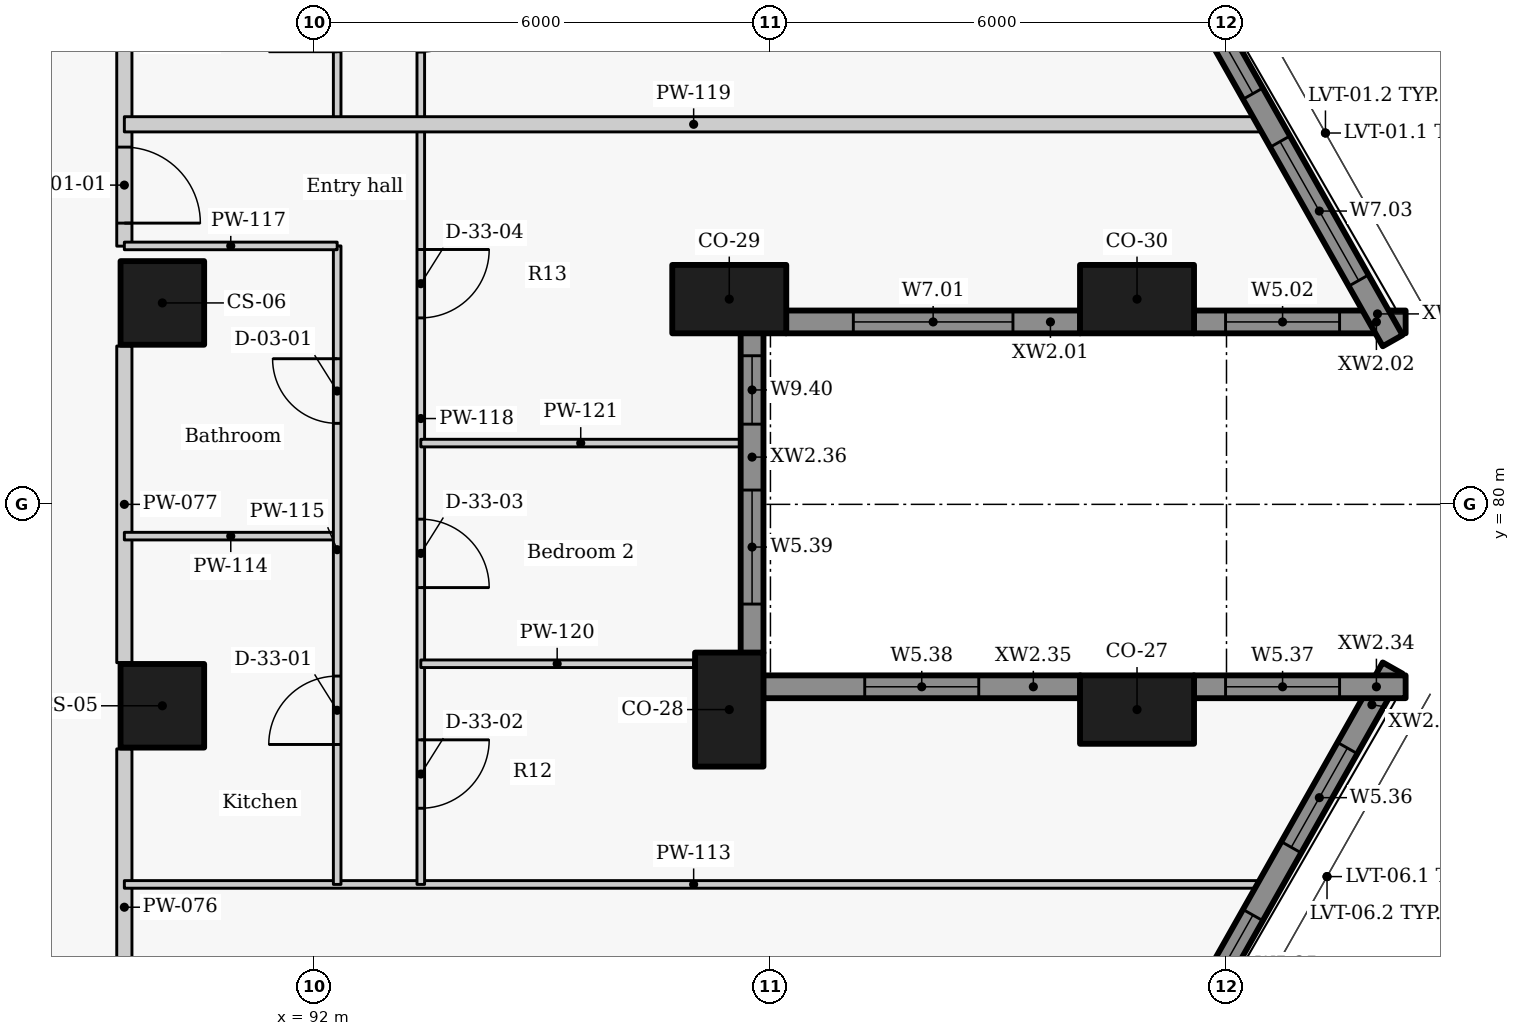
"""IFC4 building model, lengths in metres.
Left out: names, types, materials, properties, quantities, classifications, styles, units other than length and angle.
Written with IfcOpenShell. Run it as: python <this file> out.ifc"""

import sys

from ifc_helpers import new_model, si_unit, direction, frame, frame_2d, origin, origin_2d, place, context, subcontext, project, spatial, rectangle, extrude, element, fill, save


model = new_model("IFC4")
c1 = context("Model", 3, precision=1e-05, world=origin(), true_north=direction((0.0, 1.0)))
c2 = subcontext(c1, "Body", "Model", "MODEL_VIEW")
j1 = project(units=[si_unit("LENGTHUNIT", "METRE"), si_unit("PLANEANGLEUNIT", "RADIAN")], contexts=[c1])
p1 = place(None, origin())
s1 = spatial("IfcSite", under=j1, at=p1, CompositionType="ELEMENT")
p2 = place(p1, origin())
s2 = spatial("IfcBuilding", under=s1, at=p2, CompositionType="ELEMENT")
p3 = place(p2, frame((0.0, 0.0, 67.8)))
s3 = spatial("IfcBuildingStorey", under=s2, at=p3, CompositionType="ELEMENT", Elevation=67.8)
for number, where, z_axis, x_axis in (
    (1, (102.823, 77.3, 0.0), (0.0, 0.0, 1.0), (-1.0, 0.0, 0.0)),
    (2, (97.458, 77.3, 0.0), (0.0, 0.0, 1.0), (0.0, 1.0, 0.0)),
    (3, (97.458, 82.7, 0.0), (0.0, 0.0, 1.0), (1.0, 0.0, 0.0)),
    (4, (102.823, 82.7, 0.0), (0.0, 0.0, 1.0), (1.0, 0.0, 0.0)),
):
    element("IfcColumn", number, at=place(p3, frame(where, z_axis=z_axis, x_axis=x_axis)), inside=s3, PredefinedType="COLUMN", context=c2, shape_type="SweptSolid", body=[
        extrude(rectangle(XDim=1.5, YDim=0.9, at=origin_2d()), origin(), (0.0, 0.0, 1.0), 3.3),
    ])
for number, where, z_axis, x_axis in (
    (5, (90.0, 77.35, 0.0), (0.0, 0.0, 1.0), (0.0, 1.0, 0.0)),
    (6, (90.0, 82.65, 0.0), (0.0, 0.0, 1.0), (0.0, 1.0, 0.0)),
):
    element("IfcColumn", number, at=place(p3, frame(where, z_axis=z_axis, x_axis=x_axis)), inside=s3, PredefinedType="COLUMN", context=c2, shape_type="SweptSolid", body=[
        extrude(rectangle(XDim=1.1, YDim=1.1, at=origin_2d()), origin(), (0.0, 0.0, 1.0), 3.3),
    ])
p4 = place(p3, frame((98.204, 82.4, 0.0), z_axis=(0.0, 0.0, 1.0), x_axis=(1.0, 0.0, 0.0)))
e7 = element("IfcWall", 7, at=p4, inside=s3, PredefinedType="SOLIDWALL", context=c2, shape_type="SweptSolid", body=[
    extrude(rectangle(XDim=3.873, YDim=0.3, at=frame_2d((1.936, 0.0))), origin(), (0.0, 0.0, 1.0), 2.05),
])
p5 = place(p4, frame((0.886, 0.0, 0.9)))
e8 = element("IfcOpeningElement", 8, at=p5, cuts=e7, PredefinedType="OPENING", context=c2, shape_type="SweptSolid", body=[
    extrude(rectangle(XDim=2.1, YDim=1.1, at=frame_2d((1.05, 0.55))), frame((0.0, 0.16, 0.0), z_axis=(0.0, -1.0, 0.0), x_axis=(1.0, 0.0, 0.0)), (0.0, 0.0, 1.0), 0.32),
])
p6 = place(p3, frame((103.569, 82.4, 0.0), z_axis=(0.0, 0.0, 1.0), x_axis=(1.0, 0.0, 0.0)))
e9 = element("IfcWall", 9, at=p6, inside=s3, PredefinedType="SOLIDWALL", context=c2, shape_type="SweptSolid", body=[
    extrude(rectangle(XDim=2.788, YDim=0.3, at=frame_2d((1.394, 0.0))), origin(), (0.0, 0.0, 1.0), 2.05),
])
p7 = place(p6, frame((0.419, 0.0, 0.9)))
e10 = element("IfcOpeningElement", 10, at=p7, cuts=e9, PredefinedType="OPENING", context=c2, shape_type="SweptSolid", body=[
    extrude(rectangle(XDim=1.5, YDim=1.1, at=frame_2d((0.75, 0.55))), frame((0.0, 0.16, 0.0), z_axis=(0.0, -1.0, 0.0), x_axis=(1.0, 0.0, 0.0)), (0.0, 0.0, 1.0), 0.32),
])
p8 = place(p3, frame((106.186, 82.153, 0.0), z_axis=(0.0, 0.0, 1.0), x_axis=(-0.492363204642, 0.870389840655, 0.0)))
e11 = element("IfcWall", 11, at=p8, inside=s3, PredefinedType="SOLIDWALL", context=c2, shape_type="SweptSolid", body=[
    extrude(rectangle(XDim=5.626, YDim=0.3, at=frame_2d((2.813, 0.0))), origin(), (0.0, 0.0, 1.0), 2.05),
])
p9 = place(p8, frame((0.909, 0.0, 0.9)))
e12 = element("IfcOpeningElement", 12, at=p9, cuts=e11, PredefinedType="OPENING", context=c2, shape_type="SweptSolid", body=[
    extrude(rectangle(XDim=2.1, YDim=1.1, at=frame_2d((1.05, 0.55))), frame((0.0, 0.16, 0.0), z_axis=(0.0, -1.0, 0.0), x_axis=(1.0, 0.0, 0.0)), (0.0, 0.0, 1.0), 0.32),
])
p10 = place(p8, frame((3.734, 0.0, 0.9)))
e13 = element("IfcOpeningElement", 13, at=p10, cuts=e11, PredefinedType="OPENING", context=c2, shape_type="SweptSolid", body=[
    extrude(rectangle(XDim=1.5, YDim=1.1, at=frame_2d((0.75, 0.55))), frame((0.0, 0.16, 0.0), z_axis=(0.0, -1.0, 0.0), x_axis=(1.0, 0.0, 0.0)), (0.0, 0.0, 1.0), 0.32),
])
p11 = place(p3, frame((103.416, 72.949, 0.0), z_axis=(0.0, 0.0, 1.0), x_axis=(0.492363204642, 0.870389840655, 0.0)))
e14 = element("IfcWall", 14, at=p11, inside=s3, PredefinedType="SOLIDWALL", context=c2, shape_type="SweptSolid", body=[
    extrude(rectangle(XDim=5.626, YDim=0.3, at=frame_2d((2.813, 0.0))), origin(), (0.0, 0.0, 1.0), 2.05),
])
p12 = place(p11, frame((0.393, 0.0, 0.9)))
e15 = element("IfcOpeningElement", 15, at=p12, cuts=e14, PredefinedType="OPENING", context=c2, shape_type="SweptSolid", body=[
    extrude(rectangle(XDim=1.5, YDim=1.1, at=frame_2d((0.75, 0.55))), frame((0.0, 0.16, 0.0), z_axis=(0.0, -1.0, 0.0), x_axis=(1.0, 0.0, 0.0)), (0.0, 0.0, 1.0), 0.32),
])
p13 = place(p11, frame((2.917, 0.0, 0.9)))
e16 = element("IfcOpeningElement", 16, at=p13, cuts=e14, PredefinedType="OPENING", context=c2, shape_type="SweptSolid", body=[
    extrude(rectangle(XDim=1.5, YDim=1.1, at=frame_2d((0.75, 0.55))), frame((0.0, 0.16, 0.0), z_axis=(0.0, -1.0, 0.0), x_axis=(1.0, 0.0, 0.0)), (0.0, 0.0, 1.0), 0.32),
])
p14 = place(p3, frame((106.357, 77.6, 0.0), z_axis=(0.0, 0.0, 1.0), x_axis=(-1.0, 0.0, 0.0)))
e17 = element("IfcWall", 17, at=p14, inside=s3, PredefinedType="SOLIDWALL", context=c2, shape_type="SweptSolid", body=[
    extrude(rectangle(XDim=2.788, YDim=0.3, at=frame_2d((1.394, 0.0))), origin(), (0.0, 0.0, 1.0), 2.05),
])
p15 = place(p14, frame((0.869, 0.0, 0.9)))
e18 = element("IfcOpeningElement", 18, at=p15, cuts=e17, PredefinedType="OPENING", context=c2, shape_type="SweptSolid", body=[
    extrude(rectangle(XDim=1.5, YDim=1.1, at=frame_2d((0.75, 0.55))), frame((0.0, 0.16, 0.0), z_axis=(0.0, -1.0, 0.0), x_axis=(1.0, 0.0, 0.0)), (0.0, 0.0, 1.0), 0.32),
])
p16 = place(p3, frame((102.077, 77.6, 0.0), z_axis=(0.0, 0.0, 1.0), x_axis=(-1.0, 0.0, 0.0)))
e19 = element("IfcWall", 19, at=p16, inside=s3, PredefinedType="SOLIDWALL", context=c2, shape_type="SweptSolid", body=[
    extrude(rectangle(XDim=4.173, YDim=0.3, at=frame_2d((2.086, 0.0))), origin(), (0.0, 0.0, 1.0), 2.05),
])
p17 = place(p16, frame((1.336, 0.0, 0.9)))
e20 = element("IfcOpeningElement", 20, at=p17, cuts=e19, PredefinedType="OPENING", context=c2, shape_type="SweptSolid", body=[
    extrude(rectangle(XDim=1.5, YDim=1.1, at=frame_2d((0.75, 0.55))), frame((0.0, 0.16, 0.0), z_axis=(0.0, -1.0, 0.0), x_axis=(1.0, 0.0, 0.0)), (0.0, 0.0, 1.0), 0.32),
])
p18 = place(p3, frame((97.758, 78.046, 0.0), z_axis=(0.0, 0.0, 1.0), x_axis=(0.0, 1.0, 0.0)))
e21 = element("IfcWall", 21, at=p18, inside=s3, PredefinedType="SOLIDWALL", context=c2, shape_type="SweptSolid", body=[
    extrude(rectangle(XDim=4.208, YDim=0.3, at=frame_2d((2.104, 0.0))), origin(), (0.0, 0.0, 1.0), 2.05),
])
p19 = place(p18, frame((0.642, 0.0, 0.9)))
e22 = element("IfcOpeningElement", 22, at=p19, cuts=e21, PredefinedType="OPENING", context=c2, shape_type="SweptSolid", body=[
    extrude(rectangle(XDim=1.5, YDim=1.1, at=frame_2d((0.75, 0.55))), frame((0.0, 0.16, 0.0), z_axis=(0.0, -1.0, 0.0), x_axis=(1.0, 0.0, 0.0)), (0.0, 0.0, 1.0), 0.32),
])
p20 = place(p18, frame((3.009, 0.0, 0.9)))
e23 = element("IfcOpeningElement", 23, at=p20, cuts=e21, PredefinedType="OPENING", context=c2, shape_type="SweptSolid", body=[
    extrude(rectangle(XDim=0.9, YDim=1.1, at=frame_2d((0.45, 0.55))), frame((0.0, 0.16, 0.0), z_axis=(0.0, -1.0, 0.0), x_axis=(1.0, 0.0, 0.0)), (0.0, 0.0, 1.0), 0.32),
])
for number, where, z_axis, x_axis in (
    (24, (89.5, 72.617, 0.0), (0.0, 0.0, 1.0), (0.0, 1.0, 0.0)),
    (25, (89.5, 77.917, 0.0), (0.0, 0.0, 1.0), (0.0, 1.0, 0.0)),
):
    element("IfcWall", number, at=place(p3, frame(where, z_axis=z_axis, x_axis=x_axis)), inside=s3, PredefinedType="PARTITIONING", context=c2, shape_type="SweptSolid", body=[
        extrude(rectangle(XDim=4.166, YDim=0.2, at=frame_2d((2.083, 0.0))), origin(), (0.0, 0.0, 1.0), 2.95),
    ])
p21 = place(p3, frame((89.5, 87.383, 0.0), z_axis=(0.0, 0.0, 1.0), x_axis=(0.0, -1.0, 0.0)))
e26 = element("IfcWall", 26, at=p21, inside=s3, PredefinedType="PARTITIONING", context=c2, shape_type="SweptSolid", body=[
    extrude(rectangle(XDim=3.986, YDim=0.2, at=frame_2d((1.993, 0.0))), origin(), (0.0, 0.0, 1.0), 2.95),
])
p22 = place(p21, frame((2.683, 0.0, 0.0)))
e27 = element("IfcOpeningElement", 27, at=p22, cuts=e26, PredefinedType="OPENING", context=c2, shape_type="SweptSolid", body=[
    extrude(rectangle(XDim=1.0, YDim=2.1, at=frame_2d((0.5, 1.05))), frame((0.0, 0.11, 0.0), z_axis=(0.0, -1.0, 0.0), x_axis=(1.0, 0.0, 0.0)), (0.0, 0.0, 1.0), 0.22),
])
p23 = place(p3, frame((89.5, 75.0, 0.0), z_axis=(0.0, 0.0, 1.0), x_axis=(1.0, 0.0, 0.0)))
e28 = element("IfcWall", 28, at=p23, inside=s3, PredefinedType="PARTITIONING", context=c2, shape_type="SweptSolid", body=[
    extrude(rectangle(XDim=14.979, YDim=0.1, at=frame_2d((7.49, 0.0))), origin(), (0.0, 0.0, 1.0), 2.03),
])
p24 = place(p3, frame((89.5, 79.582, 0.0), z_axis=(0.0, 0.0, 1.0), x_axis=(1.0, 0.0, 0.0)))
e29 = element("IfcWall", 29, at=p24, inside=s3, PredefinedType="PARTITIONING", context=c2, shape_type="SweptSolid", body=[
    extrude(rectangle(XDim=2.8, YDim=0.1, at=frame_2d((1.4, 0.0))), origin(), (0.0, 0.0, 1.0), 2.43),
])
p25 = place(p3, frame((92.3, 75.0, 0.0), z_axis=(0.0, 0.0, 1.0), x_axis=(0.0, 1.0, 0.0)))
e30 = element("IfcWall", 30, at=p25, inside=s3, PredefinedType="PARTITIONING", context=c2, shape_type="SweptSolid", body=[
    extrude(rectangle(XDim=8.4, YDim=0.1, at=frame_2d((4.2, 0.0))), origin(), (0.0, 0.0, 1.0), 2.95),
])
p26 = place(p25, frame((1.841, 0.0, 0.0)))
e31 = element("IfcOpeningElement", 31, at=p26, cuts=e30, PredefinedType="OPENING", context=c2, shape_type="SweptSolid", body=[
    extrude(rectangle(XDim=0.9, YDim=2.1, at=frame_2d((0.45, 1.05))), frame((0.0, 0.06, 0.0), z_axis=(0.0, -1.0, 0.0), x_axis=(1.0, 0.0, 0.0)), (0.0, 0.0, 1.0), 0.12),
])
p27 = place(p25, frame((6.066, 0.0, 0.0)))
e32 = element("IfcOpeningElement", 32, at=p27, cuts=e30, PredefinedType="OPENING", context=c2, shape_type="SweptSolid", body=[
    extrude(rectangle(XDim=0.85, YDim=2.1, at=frame_2d((0.425, 1.05))), frame((0.0, 0.06, 0.0), z_axis=(0.0, -1.0, 0.0), x_axis=(1.0, 0.0, 0.0)), (0.0, 0.0, 1.0), 0.12),
])
p28 = place(p3, frame((92.3, 85.0, 0.0), z_axis=(0.0, 0.0, 1.0), x_axis=(0.0, 1.0, 0.0)))
e33 = element("IfcWall", 33, at=p28, inside=s3, PredefinedType="PARTITIONING", context=c2, shape_type="SweptSolid", body=[
    extrude(rectangle(XDim=5.15, YDim=0.1, at=frame_2d((2.575, 0.0))), origin(), (0.0, 0.0, 1.0), 2.95),
])
p29 = place(p28, frame((0.955, 0.0, 0.0)))
e34 = element("IfcOpeningElement", 34, at=p29, cuts=e33, PredefinedType="OPENING", context=c2, shape_type="SweptSolid", body=[
    extrude(rectangle(XDim=0.9, YDim=2.1, at=frame_2d((0.45, 1.05))), frame((0.0, 0.06, 0.0), z_axis=(0.0, -1.0, 0.0), x_axis=(1.0, 0.0, 0.0)), (0.0, 0.0, 1.0), 0.12),
])
p30 = place(p3, frame((89.5, 83.4, 0.0), z_axis=(0.0, 0.0, 1.0), x_axis=(1.0, 0.0, 0.0)))
e35 = element("IfcWall", 35, at=p30, inside=s3, PredefinedType="PARTITIONING", context=c2, shape_type="SweptSolid", body=[
    extrude(rectangle(XDim=2.8, YDim=0.1, at=frame_2d((1.4, 0.0))), origin(), (0.0, 0.0, 1.0), 2.43),
])
p31 = place(p3, frame((93.4, 94.25, 0.0), z_axis=(0.0, 0.0, 1.0), x_axis=(0.0, -1.0, 0.0)))
e36 = element("IfcWall", 36, at=p31, inside=s3, PredefinedType="PARTITIONING", context=c2, shape_type="SweptSolid", body=[
    extrude(rectangle(XDim=19.25, YDim=0.1, at=frame_2d((9.625, 0.0))), origin(), (0.0, 0.0, 1.0), 2.95),
])
p32 = place(p31, frame((17.348, 0.0, 0.0)))
e37 = element("IfcOpeningElement", 37, at=p32, cuts=e36, PredefinedType="OPENING", context=c2, shape_type="SweptSolid", body=[
    extrude(rectangle(XDim=0.9, YDim=2.1, at=frame_2d((0.45, 1.05))), frame((0.0, 0.06, 0.0), z_axis=(0.0, -1.0, 0.0), x_axis=(1.0, 0.0, 0.0)), (0.0, 0.0, 1.0), 0.12),
])
p33 = place(p31, frame((14.445, 0.0, 0.0)))
e38 = element("IfcOpeningElement", 38, at=p33, cuts=e36, PredefinedType="OPENING", context=c2, shape_type="SweptSolid", body=[
    extrude(rectangle(XDim=0.9, YDim=2.1, at=frame_2d((0.45, 1.05))), frame((0.0, 0.06, 0.0), z_axis=(0.0, -1.0, 0.0), x_axis=(1.0, 0.0, 0.0)), (0.0, 0.0, 1.0), 0.12),
])
p34 = place(p31, frame((10.897, 0.0, 0.0)))
e39 = element("IfcOpeningElement", 39, at=p34, cuts=e36, PredefinedType="OPENING", context=c2, shape_type="SweptSolid", body=[
    extrude(rectangle(XDim=0.9, YDim=2.1, at=frame_2d((0.45, 1.05))), frame((0.0, 0.06, 0.0), z_axis=(0.0, -1.0, 0.0), x_axis=(1.0, 0.0, 0.0)), (0.0, 0.0, 1.0), 0.12),
])
p35 = place(p31, frame((7.4, 0.0, 0.0)))
e40 = element("IfcOpeningElement", 40, at=p35, cuts=e36, PredefinedType="OPENING", context=c2, shape_type="SweptSolid", body=[
    extrude(rectangle(XDim=0.9, YDim=2.1, at=frame_2d((0.45, 1.05))), frame((0.0, 0.06, 0.0), z_axis=(0.0, -1.0, 0.0), x_axis=(1.0, 0.0, 0.0)), (0.0, 0.0, 1.0), 0.12),
])
p36 = place(p31, frame((4.6, 0.0, 0.0)))
e41 = element("IfcOpeningElement", 41, at=p36, cuts=e36, PredefinedType="OPENING", context=c2, shape_type="SweptSolid", body=[
    extrude(rectangle(XDim=0.9, YDim=2.1, at=frame_2d((0.45, 1.05))), frame((0.0, 0.06, 0.0), z_axis=(0.0, -1.0, 0.0), x_axis=(1.0, 0.0, 0.0)), (0.0, 0.0, 1.0), 0.12),
])
p37 = place(p31, frame((1.375, 0.0, 0.0)))
e42 = element("IfcOpeningElement", 42, at=p37, cuts=e36, PredefinedType="OPENING", context=c2, shape_type="SweptSolid", body=[
    extrude(rectangle(XDim=0.9, YDim=2.1, at=frame_2d((0.45, 1.05))), frame((0.0, 0.06, 0.0), z_axis=(0.0, -1.0, 0.0), x_axis=(1.0, 0.0, 0.0)), (0.0, 0.0, 1.0), 0.12),
])
p38 = place(p3, frame((89.5, 85.0, 0.0), z_axis=(0.0, 0.0, 1.0), x_axis=(1.0, 0.0, 0.0)))
e43 = element("IfcWall", 43, at=p38, inside=s3, PredefinedType="PARTITIONING", context=c2, shape_type="SweptSolid", body=[
    extrude(rectangle(XDim=14.979, YDim=0.2, at=frame_2d((7.49, 0.0))), origin(), (0.0, 0.0, 1.0), 2.03),
])
p39 = place(p3, frame((93.4, 77.903, 0.0), z_axis=(0.0, 0.0, 1.0), x_axis=(1.0, 0.0, 0.0)))
e44 = element("IfcWall", 44, at=p39, inside=s3, PredefinedType="PARTITIONING", context=c2, shape_type="SweptSolid", body=[
    extrude(rectangle(XDim=3.588, YDim=0.1, at=frame_2d((1.794, 0.0))), origin(), (0.0, 0.0, 1.0), 2.95),
])
p40 = place(p3, frame((93.4, 80.806, 0.0), z_axis=(0.0, 0.0, 1.0), x_axis=(1.0, 0.0, 0.0)))
e45 = element("IfcWall", 45, at=p40, inside=s3, PredefinedType="PARTITIONING", context=c2, shape_type="SweptSolid", body=[
    extrude(rectangle(XDim=4.208, YDim=0.1, at=frame_2d((2.104, 0.0))), origin(), (0.0, 0.0, 1.0), 2.03),
])
p41 = place(p5, origin())
e46 = element("IfcWindow", 46, at=p41, inside=s3, PartitioningType="SINGLE_PANEL", PredefinedType="WINDOW", context=c2, shape_type="SweptSolid", body=[
    extrude(rectangle(XDim=2.1, YDim=1.1, at=frame_2d((1.05, 0.55))), frame((0.0, 0.03, 0.0), z_axis=(0.0, -1.0, 0.0), x_axis=(1.0, 0.0, 0.0)), (0.0, 0.0, 1.0), 0.06),
])
fill(e8, e46)
p42 = place(p7, origin())
e47 = element("IfcWindow", 47, at=p42, inside=s3, PartitioningType="SINGLE_PANEL", PredefinedType="WINDOW", context=c2, shape_type="SweptSolid", body=[
    extrude(rectangle(XDim=1.5, YDim=1.1, at=frame_2d((0.75, 0.55))), frame((0.0, 0.03, 0.0), z_axis=(0.0, -1.0, 0.0), x_axis=(1.0, 0.0, 0.0)), (0.0, 0.0, 1.0), 0.06),
])
fill(e10, e47)
p43 = place(p9, origin())
e48 = element("IfcWindow", 48, at=p43, inside=s3, PartitioningType="SINGLE_PANEL", PredefinedType="WINDOW", context=c2, shape_type="SweptSolid", body=[
    extrude(rectangle(XDim=2.1, YDim=1.1, at=frame_2d((1.05, 0.55))), frame((0.0, 0.03, 0.0), z_axis=(0.0, -1.0, 0.0), x_axis=(1.0, 0.0, 0.0)), (0.0, 0.0, 1.0), 0.06),
])
fill(e12, e48)
p44 = place(p10, origin())
e49 = element("IfcWindow", 49, at=p44, inside=s3, PartitioningType="SINGLE_PANEL", PredefinedType="WINDOW", context=c2, shape_type="SweptSolid", body=[
    extrude(rectangle(XDim=1.5, YDim=1.1, at=frame_2d((0.75, 0.55))), frame((0.0, 0.03, 0.0), z_axis=(0.0, -1.0, 0.0), x_axis=(1.0, 0.0, 0.0)), (0.0, 0.0, 1.0), 0.06),
])
fill(e13, e49)
p45 = place(p12, origin())
e50 = element("IfcWindow", 50, at=p45, inside=s3, PartitioningType="SINGLE_PANEL", PredefinedType="WINDOW", context=c2, shape_type="SweptSolid", body=[
    extrude(rectangle(XDim=1.5, YDim=1.1, at=frame_2d((0.75, 0.55))), frame((0.0, 0.03, 0.0), z_axis=(0.0, -1.0, 0.0), x_axis=(1.0, 0.0, 0.0)), (0.0, 0.0, 1.0), 0.06),
])
fill(e15, e50)
p46 = place(p13, origin())
e51 = element("IfcWindow", 51, at=p46, inside=s3, PartitioningType="SINGLE_PANEL", PredefinedType="WINDOW", context=c2, shape_type="SweptSolid", body=[
    extrude(rectangle(XDim=1.5, YDim=1.1, at=frame_2d((0.75, 0.55))), frame((0.0, 0.03, 0.0), z_axis=(0.0, -1.0, 0.0), x_axis=(1.0, 0.0, 0.0)), (0.0, 0.0, 1.0), 0.06),
])
fill(e16, e51)
p47 = place(p15, origin())
e52 = element("IfcWindow", 52, at=p47, inside=s3, PartitioningType="SINGLE_PANEL", PredefinedType="WINDOW", context=c2, shape_type="SweptSolid", body=[
    extrude(rectangle(XDim=1.5, YDim=1.1, at=frame_2d((0.75, 0.55))), frame((0.0, 0.03, 0.0), z_axis=(0.0, -1.0, 0.0), x_axis=(1.0, 0.0, 0.0)), (0.0, 0.0, 1.0), 0.06),
])
fill(e18, e52)
p48 = place(p17, origin())
e53 = element("IfcWindow", 53, at=p48, inside=s3, PartitioningType="SINGLE_PANEL", PredefinedType="WINDOW", context=c2, shape_type="SweptSolid", body=[
    extrude(rectangle(XDim=1.5, YDim=1.1, at=frame_2d((0.75, 0.55))), frame((0.0, 0.03, 0.0), z_axis=(0.0, -1.0, 0.0), x_axis=(1.0, 0.0, 0.0)), (0.0, 0.0, 1.0), 0.06),
])
fill(e20, e53)
p49 = place(p19, origin())
e54 = element("IfcWindow", 54, at=p49, inside=s3, PartitioningType="SINGLE_PANEL", PredefinedType="WINDOW", context=c2, shape_type="SweptSolid", body=[
    extrude(rectangle(XDim=1.5, YDim=1.1, at=frame_2d((0.75, 0.55))), frame((0.0, 0.03, 0.0), z_axis=(0.0, -1.0, 0.0), x_axis=(1.0, 0.0, 0.0)), (0.0, 0.0, 1.0), 0.06),
])
fill(e22, e54)
p50 = place(p20, origin())
e55 = element("IfcWindow", 55, at=p50, inside=s3, PartitioningType="SINGLE_PANEL", PredefinedType="WINDOW", context=c2, shape_type="SweptSolid", body=[
    extrude(rectangle(XDim=0.9, YDim=1.1, at=frame_2d((0.45, 0.55))), frame((0.0, 0.03, 0.0), z_axis=(0.0, -1.0, 0.0), x_axis=(1.0, 0.0, 0.0)), (0.0, 0.0, 1.0), 0.06),
])
fill(e23, e55)
p51 = place(p22, origin())
e56 = element("IfcDoor", 56, at=p51, inside=s3, OperationType="SINGLE_SWING_RIGHT", PredefinedType="DOOR", context=c2, shape_type="SweptSolid", body=[
    extrude(rectangle(XDim=1.0, YDim=2.1, at=frame_2d((0.5, 1.05))), frame((0.0, 0.025, 0.0), z_axis=(0.0, -1.0, 0.0), x_axis=(1.0, 0.0, 0.0)), (0.0, 0.0, 1.0), 0.05),
])
fill(e27, e56)
p52 = place(p26, origin())
e57 = element("IfcDoor", 57, at=p52, inside=s3, OperationType="SINGLE_SWING_LEFT", PredefinedType="DOOR", context=c2, shape_type="SweptSolid", body=[
    extrude(rectangle(XDim=0.9, YDim=2.1, at=frame_2d((0.45, 1.05))), frame((0.0, 0.025, 0.0), z_axis=(0.0, -1.0, 0.0), x_axis=(1.0, 0.0, 0.0)), (0.0, 0.0, 1.0), 0.05),
])
fill(e31, e57)
p53 = place(p27, origin())
e58 = element("IfcDoor", 58, at=p53, inside=s3, OperationType="SINGLE_SWING_RIGHT", PredefinedType="DOOR", context=c2, shape_type="SweptSolid", body=[
    extrude(rectangle(XDim=0.85, YDim=2.1, at=frame_2d((0.425, 1.05))), frame((0.0, 0.025, 0.0), z_axis=(0.0, -1.0, 0.0), x_axis=(1.0, 0.0, 0.0)), (0.0, 0.0, 1.0), 0.05),
])
fill(e32, e58)
p54 = place(p32, origin())
e59 = element("IfcDoor", 59, at=p54, inside=s3, OperationType="SINGLE_SWING_LEFT", PredefinedType="DOOR", context=c2, shape_type="SweptSolid", body=[
    extrude(rectangle(XDim=0.9, YDim=2.1, at=frame_2d((0.45, 1.05))), frame((0.0, 0.025, 0.0), z_axis=(0.0, -1.0, 0.0), x_axis=(1.0, 0.0, 0.0)), (0.0, 0.0, 1.0), 0.05),
])
fill(e37, e59)
p55 = place(p33, origin())
e60 = element("IfcDoor", 60, at=p55, inside=s3, OperationType="SINGLE_SWING_RIGHT", PredefinedType="DOOR", context=c2, shape_type="SweptSolid", body=[
    extrude(rectangle(XDim=0.9, YDim=2.1, at=frame_2d((0.45, 1.05))), frame((0.0, 0.025, 0.0), z_axis=(0.0, -1.0, 0.0), x_axis=(1.0, 0.0, 0.0)), (0.0, 0.0, 1.0), 0.05),
])
fill(e38, e60)
p56 = place(p34, origin())
e61 = element("IfcDoor", 61, at=p56, inside=s3, OperationType="SINGLE_SWING_LEFT", PredefinedType="DOOR", context=c2, shape_type="SweptSolid", body=[
    extrude(rectangle(XDim=0.9, YDim=2.1, at=frame_2d((0.45, 1.05))), frame((0.0, 0.025, 0.0), z_axis=(0.0, -1.0, 0.0), x_axis=(1.0, 0.0, 0.0)), (0.0, 0.0, 1.0), 0.05),
])
fill(e39, e61)
save(model, sys.argv[1])
